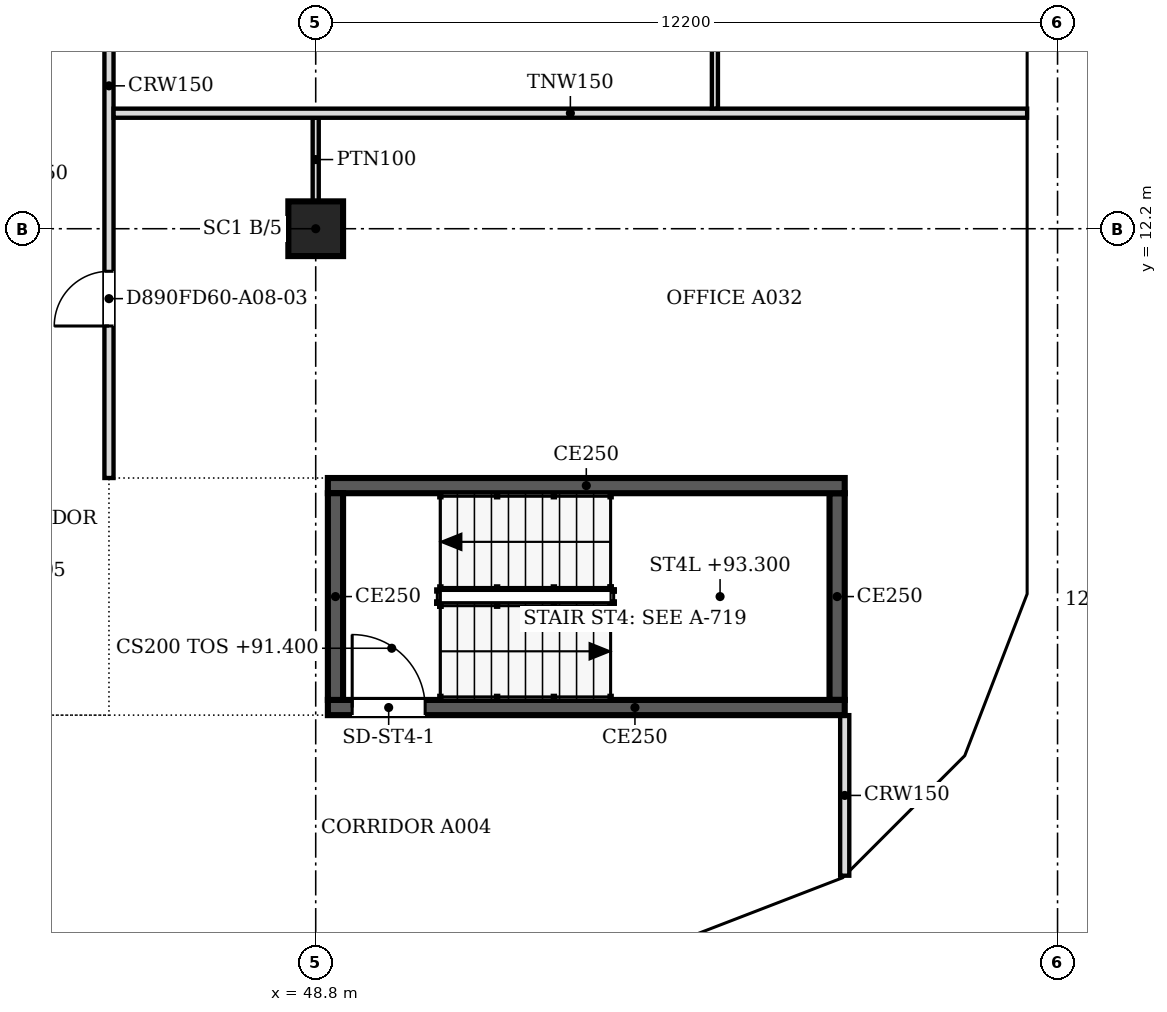
"""IFC4 building model, lengths in metres.
Left out: names, types, materials, properties, quantities, classifications, styles, units other than length and angle.
Written with IfcOpenShell. Run it as: python <this file> out.ifc"""

import sys

from ifc_helpers import new_model, si_unit, direction, frame, frame_2d, origin, origin_2d, place, context, subcontext, project, spatial, polyline, rectangle, outline, extrude, faceted_brep, source, transform, mapped, element, fill, save


model = new_model("IFC4")
c1 = context("Model", 3, precision=1e-05, world=origin(), true_north=direction((0.0, 1.0)))
c2 = subcontext(c1, "Body", "Model", "MODEL_VIEW")
j1 = project(units=[si_unit("LENGTHUNIT", "METRE"), si_unit("PLANEANGLEUNIT", "RADIAN")], contexts=[c1])
p1 = place(None, origin())
s1 = spatial("IfcSite", under=j1, at=p1, CompositionType="ELEMENT")
p2 = place(p1, origin())
s2 = spatial("IfcBuilding", under=s1, at=p2, CompositionType="ELEMENT")
p3 = place(p2, frame((0.0, 0.0, 91.4)))
s3 = spatial("IfcBuildingStorey", under=s2, at=p3, CompositionType="ELEMENT", Elevation=91.4)
p4 = place(p3, frame((48.8, 12.2, 0.0), z_axis=(0.0, 0.0, 1.0), x_axis=(1.0, 0.0, 0.0)))
e1 = element("IfcColumn", 1, at=p4, inside=s3, PredefinedType="COLUMN", context=c2, shape_type="SweptSolid", body=[
    extrude(rectangle(XDim=0.9, YDim=0.9, at=origin_2d()), origin(), (0.0, 0.0, 1.0), 3.6),
])
m1 = source(origin(), c2, "Body", "Brep", [
    faceted_brep([(0.047, -0.25, 0.0), (2.997, -0.25, 3.8), (0.047, -0.25, 7.6), (0.0, -0.25, 7.541), (0.0, -0.25, 0.059), (0.093, 0.25, 7.54), (2.944, 0.25, 3.868), (2.944, 0.25, 3.732), (0.093, 0.25, 0.06), (2.997, 0.0, 3.8), (0.047, 0.0, 0.0), (0.047, 0.0, 7.6)], [[[0, 1, 2, 3, 4]], [[5, 6, 7, 8]], [[8, 7, 9, 1, 0, 10]], [[6, 5, 11, 2, 1, 9]], [[3, 2, 11]], [[10, 0, 4]], [[8, 10, 4, 3, 11, 5]], [[9, 7, 6]]]),
])
p5 = place(p3, frame((54.81, 0.233, -3.8), z_axis=(0.0, 0.0, 1.0), x_axis=(0.932990326376, 0.359901446078, 0.0)))
e2 = element("IfcWall", 2, at=p5, inside=s3, PredefinedType="SOLIDWALL", context=c2, shape_type="MappedRepresentation", body=[
    mapped(m1, transform((0.0, 0.0, 0.0), scale=1.0)),
])
m2 = source(origin(), c2, "Body", "SweptSolid", [
    extrude(outline(polyline([(0.247, 0.665), (2.681, 3.8), (0.247, 6.935), (0.247, 0.665)])), frame((0.0, 0.26, 0.0), z_axis=(0.0, -1.0, 0.0), x_axis=(1.0, 0.0, 0.0)), (0.0, 0.0, 1.0), 0.52),
])
p6 = place(p5, origin())
e3 = element("IfcOpeningElement", 3, at=p6, cuts=e2, PredefinedType="OPENING", context=c2, shape_type="MappedRepresentation", body=[
    mapped(m2, transform((0.0, 0.0, 0.0), scale=1.0)),
])
m3 = source(origin(), c2, "Body", "Brep", [
    faceted_brep([(2.944, -0.25, 0.0), (2.997, -0.25, 0.068), (2.997, -0.25, 7.532), (2.944, -0.25, 7.6), (0.0, -0.25, 3.8), (0.053, 0.25, 3.868), (2.891, 0.25, 7.532), (2.891, 0.25, 0.068), (0.053, 0.25, 3.731), (2.944, 0.0, 0.0), (2.944, 0.0, 7.6), (0.0, 0.0, 3.8)], [[[0, 1, 2, 3, 4]], [[5, 6, 7, 8]], [[1, 0, 9]], [[10, 3, 2]], [[6, 5, 11, 4, 3, 10]], [[8, 7, 9, 0, 4, 11]], [[8, 11, 5]], [[1, 9, 7, 6, 10, 2]]]),
])
p7 = place(p3, frame((57.606, 1.312, -3.8), z_axis=(0.0, 0.0, 1.0), x_axis=(0.707147509625, 0.707066050402, 0.0)))
e4 = element("IfcWall", 4, at=p7, inside=s3, PredefinedType="SOLIDWALL", context=c2, shape_type="MappedRepresentation", body=[
    mapped(m3, transform((0.0, 0.0, 0.0), scale=1.0)),
])
m4 = source(origin(), c2, "Body", "SweptSolid", [
    extrude(outline(polyline([(2.744, 6.934), (0.316, 3.8), (2.744, 0.666), (2.744, 6.934)])), frame((0.0, 0.26, 0.0), z_axis=(0.0, -1.0, 0.0), x_axis=(1.0, 0.0, 0.0)), (0.0, 0.0, 1.0), 0.52),
])
p8 = place(p7, origin())
e5 = element("IfcOpeningElement", 5, at=p8, cuts=e4, PredefinedType="OPENING", context=c2, shape_type="MappedRepresentation", body=[
    mapped(m4, transform((0.0, 0.0, 0.0), scale=1.0)),
])
m5 = source(origin(), c2, "Body", "Brep", [
    faceted_brep([(0.053, -0.25, 0.0), (3.003, -0.25, 3.8), (0.053, -0.25, 7.6), (0.0, -0.25, 7.531), (0.0, -0.25, 0.068), (0.106, 0.25, 7.532), (2.957, 0.25, 3.86), (2.957, 0.25, 3.74), (0.106, 0.25, 0.068), (3.003, 0.0, 3.8), (0.053, 0.0, 0.0), (0.053, 0.0, 7.6)], [[[0, 1, 2, 3, 4]], [[5, 6, 7, 8]], [[8, 7, 9, 1, 0, 10]], [[6, 5, 11, 2, 1, 9]], [[3, 2, 11]], [[10, 0, 4]], [[8, 10, 4, 3, 11, 5]], [[9, 7, 6]]]),
])
p9 = place(p3, frame((59.669, 3.344, -3.8), z_axis=(0.0, 0.0, 1.0), x_axis=(0.35992665181, 0.932980602862, 0.0)))
e6 = element("IfcWall", 6, at=p9, inside=s3, PredefinedType="SOLIDWALL", context=c2, shape_type="MappedRepresentation", body=[
    mapped(m5, transform((0.0, 0.0, 0.0), scale=1.0)),
])
m6 = source(origin(), c2, "Body", "SweptSolid", [
    extrude(outline(polyline([(0.253, 0.665), (2.687, 3.8), (0.253, 6.935), (0.253, 0.665)])), frame((0.0, 0.26, 0.0), z_axis=(0.0, -1.0, 0.0), x_axis=(1.0, 0.0, 0.0)), (0.0, 0.0, 1.0), 0.52),
])
p10 = place(p9, origin())
e7 = element("IfcOpeningElement", 7, at=p10, cuts=e6, PredefinedType="OPENING", context=c2, shape_type="MappedRepresentation", body=[
    mapped(m6, transform((0.0, 0.0, 0.0), scale=1.0)),
])
m7 = source(origin(), c2, "Body", "Brep", [
    faceted_brep([(3.003, -0.25, 0.0), (6.053, -0.25, 3.8), (3.003, -0.25, 7.6), (0.0, -0.25, 3.8), (0.047, 0.25, 3.859), (3.003, 0.25, 7.6), (6.053, 0.25, 3.8), (3.003, 0.25, 0.0), (0.047, 0.25, 3.741), (0.0, 0.0, 3.8)], [[[0, 1, 2, 3]], [[4, 5, 6, 7, 8]], [[7, 6, 1, 0]], [[6, 5, 2, 1]], [[5, 4, 9, 3, 2]], [[8, 7, 0, 3, 9]], [[8, 9, 4]]]),
])
p11 = place(p3, frame((60.75, 6.146, -3.8), z_axis=(0.0, 0.0, 1.0), x_axis=(0.0, 1.0, 0.0)))
e8 = element("IfcWall", 8, at=p11, inside=s3, PredefinedType="SOLIDWALL", context=c2, shape_type="MappedRepresentation", body=[
    mapped(m7, transform((0.0, 0.0, 0.0), scale=1.0)),
])
m8 = source(origin(), c2, "Body", "SweptSolid", [
    extrude(outline(polyline([(3.005, 0.401), (5.733, 3.8), (3.005, 7.199), (0.319, 3.8), (3.005, 0.401)])), frame((0.0, 0.26, 0.0), z_axis=(0.0, -1.0, 0.0), x_axis=(1.0, 0.0, 0.0)), (0.0, 0.0, 1.0), 0.52),
])
p12 = place(p11, origin())
e9 = element("IfcOpeningElement", 9, at=p12, cuts=e8, PredefinedType="OPENING", context=c2, shape_type="MappedRepresentation", body=[
    mapped(m8, transform((0.0, 0.0, 0.0), scale=1.0)),
])
m9 = source(origin(), c2, "Body", "SweptSolid", [
    extrude(outline(polyline([(3.05, 0.0), (6.1, 3.8), (3.05, 7.6), (0.0, 3.8), (3.05, 0.0)])), frame((0.0, 0.25, 0.0), z_axis=(0.0, -1.0, 0.0), x_axis=(1.0, 0.0, 0.0)), (0.0, 0.0, 1.0), 0.5),
])
p13 = place(p3, frame((60.75, 12.2, -3.8), z_axis=(0.0, 0.0, 1.0), x_axis=(0.0, 1.0, 0.0)))
e10 = element("IfcWall", 10, at=p13, inside=s3, PredefinedType="SOLIDWALL", context=c2, shape_type="MappedRepresentation", body=[
    mapped(m9, transform((0.0, 0.0, 0.0), scale=1.0)),
])
m10 = source(origin(), c2, "Body", "SweptSolid", [
    extrude(outline(polyline([(3.05, 0.399), (5.78, 3.8), (3.05, 7.2), (0.321, 3.8), (3.05, 0.399)])), frame((0.0, 0.26, 0.0), z_axis=(0.0, -1.0, 0.0), x_axis=(1.0, 0.0, 0.0)), (0.0, 0.0, 1.0), 0.52),
])
p14 = place(p13, origin())
e11 = element("IfcOpeningElement", 11, at=p14, cuts=e10, PredefinedType="OPENING", context=c2, shape_type="MappedRepresentation", body=[
    mapped(m10, transform((0.0, 0.0, 0.0), scale=1.0)),
])
p15 = place(p2, frame((0.0, 0.0, 95.2)))
s4 = spatial("IfcBuildingStorey", under=s2, at=p15, CompositionType="ELEMENT", Elevation=95.2)
m11 = source(origin(), c2, "Body", "Brep", [
    faceted_brep([(2.95, -0.25, 0.0), (3.003, -0.25, 0.068), (3.003, -0.25, 7.532), (2.95, -0.25, 7.6), (0.0, -0.25, 3.8), (0.047, 0.25, 3.86), (2.898, 0.25, 7.532), (2.898, 0.25, 0.068), (0.047, 0.25, 3.74), (2.95, 0.0, 0.0), (2.95, 0.0, 7.6), (0.0, 0.0, 3.8)], [[[0, 1, 2, 3, 4]], [[5, 6, 7, 8]], [[1, 0, 9]], [[10, 3, 2]], [[6, 5, 11, 4, 3, 10]], [[8, 7, 9, 0, 4, 11]], [[8, 11, 5]], [[1, 9, 7, 6, 10, 2]]]),
])
p16 = place(p15, frame((54.854, 0.25, -3.8), z_axis=(0.0, 0.0, 1.0), x_axis=(0.932970071518, 0.359953949349, 0.0)))
e12 = element("IfcWall", 12, at=p16, inside=s4, PredefinedType="SOLIDWALL", context=c2, shape_type="MappedRepresentation", body=[
    mapped(m11, transform((0.0, 0.0, 0.0), scale=1.0)),
])
m12 = source(origin(), c2, "Body", "SweptSolid", [
    extrude(outline(polyline([(2.75, 6.935), (0.316, 3.8), (2.75, 0.665), (2.75, 6.935)])), frame((0.0, 0.26, 0.0), z_axis=(0.0, -1.0, 0.0), x_axis=(1.0, 0.0, 0.0)), (0.0, 0.0, 1.0), 0.52),
])
p17 = place(p16, origin())
e13 = element("IfcOpeningElement", 13, at=p17, cuts=e12, PredefinedType="OPENING", context=c2, shape_type="MappedRepresentation", body=[
    mapped(m12, transform((0.0, 0.0, 0.0), scale=1.0)),
])
m13 = source(origin(), c2, "Body", "Brep", [
    faceted_brep([(0.053, -0.25, 0.0), (2.997, -0.25, 3.8), (0.053, -0.25, 7.6), (0.0, -0.25, 7.532), (0.0, -0.25, 0.068), (0.106, 0.25, 7.532), (2.944, 0.25, 3.868), (2.944, 0.25, 3.732), (0.106, 0.25, 0.068), (2.997, 0.0, 3.8), (0.053, 0.0, 0.0), (0.053, 0.0, 7.6)], [[[0, 1, 2, 3, 4]], [[5, 6, 7, 8]], [[8, 7, 9, 1, 0, 10]], [[6, 5, 11, 2, 1, 9]], [[3, 2, 11]], [[10, 0, 4]], [[8, 10, 4, 3, 11, 5]], [[9, 7, 6]]]),
])
p18 = place(p15, frame((57.569, 1.274, -3.8), z_axis=(0.0, 0.0, 1.0), x_axis=(0.707066050402, 0.707147509625, 0.0)))
e14 = element("IfcWall", 14, at=p18, inside=s4, PredefinedType="SOLIDWALL", context=c2, shape_type="MappedRepresentation", body=[
    mapped(m13, transform((0.0, 0.0, 0.0), scale=1.0)),
])
m14 = source(origin(), c2, "Body", "SweptSolid", [
    extrude(outline(polyline([(0.253, 0.667), (2.681, 3.8), (0.253, 6.934), (0.253, 0.667)])), frame((0.0, 0.26, 0.0), z_axis=(0.0, -1.0, 0.0), x_axis=(1.0, 0.0, 0.0)), (0.0, 0.0, 1.0), 0.52),
])
p19 = place(p18, origin())
e15 = element("IfcOpeningElement", 15, at=p19, cuts=e14, PredefinedType="OPENING", context=c2, shape_type="MappedRepresentation", body=[
    mapped(m14, transform((0.0, 0.0, 0.0), scale=1.0)),
])
m15 = source(origin(), c2, "Body", "Brep", [
    faceted_brep([(2.95, -0.25, 0.0), (2.997, -0.25, 0.059), (2.997, -0.25, 7.541), (2.95, -0.25, 7.6), (0.0, -0.25, 3.8), (0.053, 0.25, 3.868), (2.904, 0.25, 7.54), (2.904, 0.25, 0.06), (0.053, 0.25, 3.732), (2.95, 0.0, 0.0), (2.95, 0.0, 7.6), (0.0, 0.0, 3.8)], [[[0, 1, 2, 3, 4]], [[5, 6, 7, 8]], [[1, 0, 9]], [[10, 3, 2]], [[6, 5, 11, 4, 3, 10]], [[8, 7, 9, 0, 4, 11]], [[8, 11, 5]], [[1, 9, 7, 6, 10, 2]]]),
])
p20 = place(p15, frame((59.688, 3.394, -3.8), z_axis=(0.0, 0.0, 1.0), x_axis=(0.359972353723, 0.932962970624, 0.0)))
e16 = element("IfcWall", 16, at=p20, inside=s4, PredefinedType="SOLIDWALL", context=c2, shape_type="MappedRepresentation", body=[
    mapped(m15, transform((0.0, 0.0, 0.0), scale=1.0)),
])
p21 = place(p20, origin())
e17 = element("IfcOpeningElement", 17, at=p21, cuts=e16, PredefinedType="OPENING", context=c2, shape_type="MappedRepresentation", body=[
    mapped(m12, transform((0.0, 0.0, 0.0), scale=1.0)),
])
m16 = source(origin(), c2, "Body", "Brep", [
    faceted_brep([(0.047, -0.25, 0.0), (3.05, -0.25, 3.8), (0.047, -0.25, 7.6), (0.0, -0.25, 7.54), (0.0, -0.25, 0.06), (0.093, 0.25, 7.541), (3.05, 0.25, 3.8), (0.093, 0.25, 0.059), (0.047, 0.0, 0.0), (0.047, 0.0, 7.6)], [[[0, 1, 2, 3, 4]], [[5, 6, 7]], [[7, 6, 1, 0, 8]], [[6, 5, 9, 2, 1]], [[3, 2, 9]], [[8, 0, 4]], [[7, 8, 4, 3, 9, 5]]]),
])
p22 = place(p15, frame((60.75, 6.1, -3.8), z_axis=(0.0, 0.0, 1.0), x_axis=(0.0, 1.0, 0.0)))
e18 = element("IfcWall", 18, at=p22, inside=s4, PredefinedType="SOLIDWALL", context=c2, shape_type="MappedRepresentation", body=[
    mapped(m16, transform((0.0, 0.0, 0.0), scale=1.0)),
])
m17 = source(origin(), c2, "Body", "SweptSolid", [
    extrude(outline(polyline([(0.247, 0.656), (2.731, 3.8), (0.247, 6.944), (0.247, 0.656)])), frame((0.0, 0.26, 0.0), z_axis=(0.0, -1.0, 0.0), x_axis=(1.0, 0.0, 0.0)), (0.0, 0.0, 1.0), 0.52),
])
p23 = place(p22, origin())
e19 = element("IfcOpeningElement", 19, at=p23, cuts=e18, PredefinedType="OPENING", context=c2, shape_type="MappedRepresentation", body=[
    mapped(m17, transform((0.0, 0.0, 0.0), scale=1.0)),
])
m18 = source(origin(), c2, "Body", "SweptSolid", [
    extrude(outline(polyline([(3.05, 0.0), (6.1, 3.8), (3.05, 7.6), (0.0, 3.8), (3.05, 0.0)])), frame((0.0, 0.25, 0.0), z_axis=(0.0, -1.0, 0.0), x_axis=(1.0, 0.0, 0.0)), (0.0, 0.0, 1.0), 0.5),
])
p24 = place(p15, frame((60.75, 9.15, -3.8), z_axis=(0.0, 0.0, 1.0), x_axis=(0.0, 1.0, 0.0)))
e20 = element("IfcWall", 20, at=p24, inside=s4, PredefinedType="SOLIDWALL", context=c2, shape_type="MappedRepresentation", body=[
    mapped(m18, transform((0.0, 0.0, 0.0), scale=1.0)),
])
m19 = source(origin(), c2, "Body", "SweptSolid", [
    extrude(outline(polyline([(3.05, 0.399), (5.78, 3.8), (3.05, 7.201), (0.321, 3.8), (3.05, 0.399)])), frame((0.0, 0.26, 0.0), z_axis=(0.0, -1.0, 0.0), x_axis=(1.0, 0.0, 0.0)), (0.0, 0.0, 1.0), 0.52),
])
p25 = place(p24, origin())
e21 = element("IfcOpeningElement", 21, at=p25, cuts=e20, PredefinedType="OPENING", context=c2, shape_type="MappedRepresentation", body=[
    mapped(m19, transform((0.0, 0.0, 0.0), scale=1.0)),
])
p26 = place(p3, frame((57.5, 4.325, 0.0), z_axis=(0.0, 0.0, 1.0), x_axis=(-1.0, 0.0, 0.0)))
e22 = element("IfcWall", 22, at=p26, inside=s3, PredefinedType="SOLIDWALL", context=c2, shape_type="SweptSolid", body=[
    extrude(rectangle(XDim=8.5, YDim=0.25, at=frame_2d((4.25, 0.0))), origin(), (0.0, 0.0, 1.0), 3.8),
])
m20 = source(origin(), c2, "Body", "SweptSolid", [
    extrude(rectangle(XDim=1.2, YDim=2.1, at=frame_2d((0.6, 1.05))), frame((0.0, 0.135, 0.0), z_axis=(0.0, -1.0, 0.0), x_axis=(1.0, 0.0, 0.0)), (0.0, 0.0, 1.0), 0.27),
])
p27 = place(p26, frame((6.9, 0.0, 0.0)))
e23 = element("IfcOpeningElement", 23, at=p27, cuts=e22, PredefinedType="OPENING", context=c2, shape_type="MappedRepresentation", body=[
    mapped(m20, transform((0.0, 0.0, 0.0), scale=1.0)),
])
p28 = place(p3, frame((49.125, 4.45, 0.0), z_axis=(0.0, 0.0, 1.0), x_axis=(0.0, 1.0, 0.0)))
e24 = element("IfcWall", 24, at=p28, inside=s3, PredefinedType="SOLIDWALL", context=c2, shape_type="SweptSolid", body=[
    extrude(rectangle(XDim=3.4, YDim=0.25, at=frame_2d((1.7, 0.0))), origin(), (0.0, 0.0, 1.0), 3.8),
])
p29 = place(p3, frame((49.0, 7.975, 0.0), z_axis=(0.0, 0.0, 1.0), x_axis=(1.0, 0.0, 0.0)))
e25 = element("IfcWall", 25, at=p29, inside=s3, PredefinedType="SOLIDWALL", context=c2, shape_type="SweptSolid", body=[
    extrude(rectangle(XDim=8.5, YDim=0.25, at=frame_2d((4.25, 0.0))), origin(), (0.0, 0.0, 1.0), 3.8),
])
p30 = place(p3, frame((57.375, 7.85, 0.0), z_axis=(0.0, 0.0, 1.0), x_axis=(0.0, -1.0, 0.0)))
e26 = element("IfcWall", 26, at=p30, inside=s3, PredefinedType="SOLIDWALL", context=c2, shape_type="SweptSolid", body=[
    extrude(rectangle(XDim=3.4, YDim=0.25, at=frame_2d((1.7, 0.0))), origin(), (0.0, 0.0, 1.0), 3.8),
])
p31 = place(p3, frame((57.5, 1.559, 0.0), z_axis=(0.0, 0.0, 1.0), x_axis=(0.0, 1.0, 0.0)))
e27 = element("IfcWall", 27, at=p31, inside=s3, PredefinedType="PARTITIONING", context=c2, shape_type="SweptSolid", body=[
    extrude(rectangle(XDim=2.641, YDim=0.15, at=frame_2d((1.32, 0.0))), origin(), (0.0, 0.0, 1.0), 2.895),
])
p32 = place(p3, frame((45.4, 21.924, 0.0), z_axis=(0.0, 0.0, 1.0), x_axis=(0.0, -1.0, 0.0)))
e28 = element("IfcWall", 28, at=p32, inside=s3, PredefinedType="PARTITIONING", context=c2, shape_type="SweptSolid", body=[
    extrude(rectangle(XDim=13.824, YDim=0.15, at=frame_2d((6.912, 0.0))), origin(), (0.0, 0.0, 1.0), 2.895),
])
m21 = source(origin(), c2, "Body", "SweptSolid", [
    extrude(rectangle(XDim=0.9, YDim=2.1, at=frame_2d((0.45, 1.05))), frame((0.0, 0.085, 0.0), z_axis=(0.0, -1.0, 0.0), x_axis=(1.0, 0.0, 0.0)), (0.0, 0.0, 1.0), 0.17),
])
p33 = place(p32, frame((10.424, 0.0, 0.0)))
e29 = element("IfcOpeningElement", 29, at=p33, cuts=e28, PredefinedType="OPENING", context=c2, shape_type="MappedRepresentation", body=[
    mapped(m21, transform((0.0, 0.0, 0.0), scale=1.0)),
])
p34 = place(p32, frame((3.424, 0.0, 0.0)))
e30 = element("IfcOpeningElement", 30, at=p34, cuts=e28, PredefinedType="OPENING", context=c2, shape_type="MappedRepresentation", body=[
    mapped(m21, transform((0.0, 0.0, 0.0), scale=1.0)),
])
p35 = place(p3, frame((48.8, 12.65, 0.0), z_axis=(0.0, 0.0, 1.0), x_axis=(0.0, 1.0, 0.0)))
e31 = element("IfcWall", 31, at=p35, inside=s3, PredefinedType="PARTITIONING", context=c2, shape_type="SweptSolid", body=[
    extrude(rectangle(XDim=1.375, YDim=0.1, at=frame_2d((0.688, 0.0))), origin(), (0.0, 0.0, 1.0), 2.895),
])
p36 = place(p3, frame((45.476, 14.1, 0.0), z_axis=(0.0, 0.0, 1.0), x_axis=(1.0, 0.0, 0.0)))
e32 = element("IfcWall", 32, at=p36, inside=s3, PredefinedType="PARTITIONING", context=c2, shape_type="SweptSolid", body=[
    extrude(rectangle(XDim=15.024, YDim=0.15, at=frame_2d((7.512, 0.0))), origin(), (0.0, 0.0, 1.0), 2.895),
])
p37 = place(p3, frame((55.365, 21.924, 0.0), z_axis=(0.0, 0.0, 1.0), x_axis=(0.0, -1.0, 0.0)))
e33 = element("IfcWall", 33, at=p37, inside=s3, PredefinedType="PARTITIONING", context=c2, shape_type="SweptSolid", body=[
    extrude(rectangle(XDim=7.748, YDim=0.1, at=frame_2d((3.874, 0.0))), origin(), (0.0, 0.0, 1.0), 2.895),
])
m22 = source(origin(), c2, "Body", "SweptSolid", [
    extrude(rectangle(XDim=0.9, YDim=2.1, at=frame_2d((0.45, 1.05))), frame((0.0, 0.06, 0.0), z_axis=(0.0, -1.0, 0.0), x_axis=(1.0, 0.0, 0.0)), (0.0, 0.0, 1.0), 0.12),
])
p38 = place(p37, frame((3.448, 0.0, 0.0)))
e34 = element("IfcOpeningElement", 34, at=p38, cuts=e33, PredefinedType="OPENING", context=c2, shape_type="MappedRepresentation", body=[
    mapped(m22, transform((0.0, 0.0, 0.0), scale=1.0)),
])
m23 = source(origin(), c2, "Body", "SweptSolid", [
    extrude(rectangle(XDim=1.2, YDim=2.1, at=frame_2d((0.6, 1.05))), frame((0.0, 0.025, 0.0), z_axis=(0.0, -1.0, 0.0), x_axis=(1.0, 0.0, 0.0)), (0.0, 0.0, 1.0), 0.05),
])
p39 = place(p27, origin())
e35 = element("IfcDoor", 35, at=p39, inside=s3, OperationType="SINGLE_SWING_RIGHT", PredefinedType="DOOR", context=c2, shape_type="MappedRepresentation", body=[
    mapped(m23, transform((0.0, 0.0, 0.0), scale=1.0)),
])
fill(e23, e35)
m24 = source(origin(), c2, "Body", "SweptSolid", [
    extrude(rectangle(XDim=0.9, YDim=2.1, at=frame_2d((0.45, 1.05))), frame((0.0, 0.025, 0.0), z_axis=(0.0, -1.0, 0.0), x_axis=(1.0, 0.0, 0.0)), (0.0, 0.0, 1.0), 0.05),
])
p40 = place(p33, origin())
e36 = element("IfcDoor", 36, at=p40, inside=s3, OperationType="SINGLE_SWING_RIGHT", PredefinedType="DOOR", context=c2, shape_type="MappedRepresentation", body=[
    mapped(m24, transform((0.0, 0.0, 0.0), scale=1.0)),
])
fill(e29, e36)
save(model, sys.argv[1])
